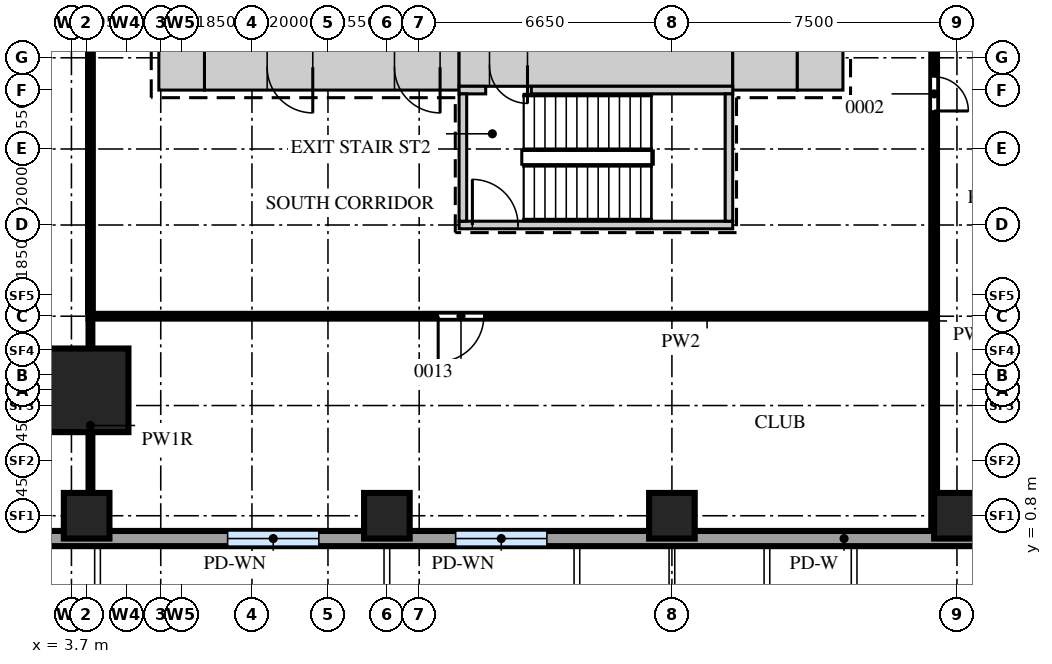
"""IFC4 building model, lengths in metres.
Left out: names, types, materials, properties, quantities, classifications, styles, units other than length and angle.
Written with IfcOpenShell. Run it as: python <this file> out.ifc"""

import sys

from ifc_helpers import new_model, si_unit, direction, frame, frame_2d, origin, origin_2d, place, context, subcontext, project, spatial, rectangle, extrude, source, transform, mapped, element, fill, save


model = new_model("IFC4")
c1 = context("Model", 3, precision=1e-05, world=origin(), true_north=direction((0.0, 1.0)))
c2 = subcontext(c1, "Body", "Model", "MODEL_VIEW")
j1 = project(units=[si_unit("LENGTHUNIT", "METRE"), si_unit("PLANEANGLEUNIT", "RADIAN")], contexts=[c1])
p1 = place(None, origin())
s1 = spatial("IfcSite", under=j1, at=p1, CompositionType="ELEMENT")
p2 = place(p1, origin())
s2 = spatial("IfcBuilding", under=s1, at=p2, CompositionType="ELEMENT")
p3 = place(p2, frame((0.0, 0.0, 28.5)))
s3 = spatial("IfcBuildingStorey", under=s2, at=p3, CompositionType="ELEMENT", Elevation=28.5)
m1 = source(origin(), c2, "Body", "SweptSolid", [
    extrude(rectangle(XDim=6.7, YDim=1.2, at=frame_2d((3.35, 0.0))), origin(), (0.0, 0.0, 1.0), 4.0),
])
p4 = place(p3, frame((7.2, 12.6, 0.0), z_axis=(0.0, 0.0, 1.0), x_axis=(1.0, 0.0, 0.0)))
e1 = element("IfcWall", 1, at=p4, inside=s3, PredefinedType="SHEAR", context=c2, shape_type="MappedRepresentation", body=[
    mapped(m1, transform((0.0, 0.0, 0.0))),
])
m2 = source(origin(), c2, "Body", "SweptSolid", [
    extrude(rectangle(XDim=1.2, YDim=2.1, at=frame_2d((0.6, 1.05))), frame((0.0, 0.61, 0.0), z_axis=(0.0, -1.0, 0.0), x_axis=(1.0, 0.0, 0.0)), (0.0, 0.0, 1.0), 1.22),
])
p5 = place(p4, frame((5.0, 0.0, 0.0)))
e2 = element("IfcOpeningElement", 2, at=p5, cuts=e1, PredefinedType="OPENING", context=c2, shape_type="MappedRepresentation", body=[
    mapped(m2, transform((0.0, 0.0, 0.0))),
])
p6 = place(p4, frame((1.65, 0.0, 0.0)))
e3 = element("IfcOpeningElement", 3, at=p6, cuts=e1, PredefinedType="OPENING", context=c2, shape_type="MappedRepresentation", body=[
    mapped(m2, transform((0.0, 0.0, 0.0))),
])
m3 = source(origin(), c2, "Body", "SweptSolid", [
    extrude(rectangle(XDim=7.2, YDim=1.1, at=frame_2d((3.6, 0.0))), origin(), (0.0, 0.0, 1.0), 4.0),
])
p7 = place(p3, frame((13.9, 12.65, 0.0), z_axis=(0.0, 0.0, 1.0), x_axis=(1.0, 0.0, 0.0)))
e4 = element("IfcWall", 4, at=p7, inside=s3, PredefinedType="SHEAR", context=c2, shape_type="MappedRepresentation", body=[
    mapped(m3, transform((0.0, 0.0, 0.0))),
])
m4 = source(origin(), c2, "Body", "SweptSolid", [
    extrude(rectangle(XDim=1.0, YDim=2.1, at=frame_2d((0.5, 1.05))), frame((0.0, 0.56, 0.0), z_axis=(0.0, -1.0, 0.0), x_axis=(1.0, 0.0, 0.0)), (0.0, 0.0, 1.0), 1.12),
])
p8 = place(p7, frame((0.8, 0.0, 0.0)))
e5 = element("IfcOpeningElement", 5, at=p8, cuts=e4, PredefinedType="OPENING", context=c2, shape_type="MappedRepresentation", body=[
    mapped(m4, transform((0.0, 0.0, 0.0))),
])
m5 = source(origin(), c2, "Body", "SweptSolid", [
    extrude(rectangle(XDim=1.7, YDim=1.2, at=frame_2d((0.85, 0.0))), origin(), (0.0, 0.0, 1.0), 4.0),
])
p9 = place(p3, frame((21.1, 12.6, 0.0), z_axis=(0.0, 0.0, 1.0), x_axis=(1.0, 0.0, 0.0)))
e6 = element("IfcWall", 6, at=p9, inside=s3, PredefinedType="SHEAR", context=c2, shape_type="MappedRepresentation", body=[
    mapped(m5, transform((0.0, 0.0, 0.0))),
])
m6 = source(origin(), c2, "Body", "SweptSolid", [
    extrude(rectangle(XDim=1.2, YDim=1.2, at=frame_2d((0.6, 0.0))), origin(), (0.0, 0.0, 1.0), 4.0),
])
for number, where, z_axis, x_axis in (
    (7, (22.8, 12.6, 0.0), (0.0, 0.0, 1.0), (1.0, 0.0, 0.0)),
    (8, (6.0, 12.6, 0.0), (0.0, 0.0, 1.0), (1.0, 0.0, 0.0)),
):
    element("IfcWall", number, at=place(p3, frame(where, z_axis=z_axis, x_axis=x_axis)), inside=s3, PredefinedType="SHEAR", context=c2, shape_type="MappedRepresentation", body=[
        mapped(m6, transform((0.0, 0.0, 0.0))),
    ])
m7 = source(origin(), c2, "Body", "SweptSolid", [
    extrude(rectangle(XDim=0.7, YDim=0.2, at=frame_2d((0.35, 0.0))), origin(), (0.0, 0.0, 1.0), 4.0),
])
p10 = place(p3, frame((13.9, 12.0, 0.0), z_axis=(0.0, 0.0, 1.0), x_axis=(1.0, 0.0, 0.0)))
e9 = element("IfcWall", 9, at=p10, inside=s3, PredefinedType="SHEAR", context=c2, shape_type="MappedRepresentation", body=[
    mapped(m7, transform((0.0, 0.0, 0.0))),
])
m8 = source(origin(), c2, "Body", "SweptSolid", [
    extrude(rectangle(XDim=5.3, YDim=0.2, at=frame_2d((2.65, 0.0))), origin(), (0.0, 0.0, 1.0), 4.0),
])
p11 = place(p3, frame((15.8, 12.0, 0.0), z_axis=(0.0, 0.0, 1.0), x_axis=(1.0, 0.0, 0.0)))
e10 = element("IfcWall", 10, at=p11, inside=s3, PredefinedType="SHEAR", context=c2, shape_type="MappedRepresentation", body=[
    mapped(m8, transform((0.0, 0.0, 0.0))),
])
m9 = source(origin(), c2, "Body", "SweptSolid", [
    extrude(rectangle(XDim=7.2, YDim=0.2, at=frame_2d((3.6, 0.0))), origin(), (0.0, 0.0, 1.0), 4.0),
])
p12 = place(p3, frame((13.9, 8.45, 0.0), z_axis=(0.0, 0.0, 1.0), x_axis=(1.0, 0.0, 0.0)))
e11 = element("IfcWall", 11, at=p12, inside=s3, PredefinedType="SHEAR", context=c2, shape_type="MappedRepresentation", body=[
    mapped(m9, transform((0.0, 0.0, 0.0))),
])
m10 = source(origin(), c2, "Body", "SweptSolid", [
    extrude(rectangle(XDim=1.2, YDim=2.1, at=frame_2d((0.6, 1.05))), frame((0.0, 0.11, 0.0), z_axis=(0.0, -1.0, 0.0), x_axis=(1.0, 0.0, 0.0)), (0.0, 0.0, 1.0), 0.22),
])
p13 = place(p12, frame((0.35, 0.0, 0.0)))
e12 = element("IfcOpeningElement", 12, at=p13, cuts=e11, PredefinedType="OPENING", context=c2, shape_type="MappedRepresentation", body=[
    mapped(m10, transform((0.0, 0.0, 0.0))),
])
m11 = source(origin(), c2, "Body", "SweptSolid", [
    extrude(rectangle(XDim=3.35, YDim=0.2, at=frame_2d((1.675, 0.0))), origin(), (0.0, 0.0, 1.0), 4.0),
])
for number, where, z_axis, x_axis in (
    (13, (21.0, 8.55, 0.0), (0.0, 0.0, 1.0), (0.0, 1.0, 0.0)),
    (14, (14.0, 8.55, 0.0), (0.0, 0.0, 1.0), (0.0, 1.0, 0.0)),
):
    element("IfcWall", number, at=place(p3, frame(where, z_axis=z_axis, x_axis=x_axis)), inside=s3, PredefinedType="SHEAR", context=c2, shape_type="MappedRepresentation", body=[
        mapped(m11, transform((0.0, 0.0, 0.0))),
    ])
m12 = source(origin(), c2, "Body", "SweptSolid", [
    extrude(rectangle(XDim=2.2, YDim=2.2, at=origin_2d()), origin(), (0.0, 0.0, 1.0), 4.5),
])
p14 = place(p3, frame((4.1, 4.1, 0.0), z_axis=(0.0, 0.0, 1.0), x_axis=(1.0, 0.0, 0.0)))
e15 = element("IfcColumn", 15, at=p14, inside=s3, PredefinedType="COLUMN", context=c2, shape_type="MappedRepresentation", body=[
    mapped(m12, transform((0.0, 0.0, 0.0))),
])
m13 = source(origin(), c2, "Body", "SweptSolid", [
    extrude(rectangle(XDim=1.2, YDim=1.2, at=origin_2d()), origin(), (0.0, 0.0, 1.0), 4.0),
])
for number, where, z_axis, x_axis in (
    (16, (4.1, 0.8, 0.0), (0.0, 0.0, 1.0), (1.0, 0.0, 0.0)),
    (17, (12.0, 0.8, 0.0), (0.0, 0.0, 1.0), (1.0, 0.0, 0.0)),
    (18, (19.5, 0.8, 0.0), (0.0, 0.0, 1.0), (1.0, 0.0, 0.0)),
    (19, (27.0, 0.8, 0.0), (0.0, 0.0, 1.0), (1.0, 0.0, 0.0)),
):
    element("IfcColumn", number, at=place(p3, frame(where, z_axis=z_axis, x_axis=x_axis)), inside=s3, PredefinedType="COLUMN", context=c2, shape_type="MappedRepresentation", body=[
        mapped(m13, transform((0.0, 0.0, 0.0))),
    ])
m14 = source(origin(), c2, "Body", "SweptSolid", [
    extrude(rectangle(XDim=33.64, YDim=0.4, at=frame_2d((16.82, 0.0))), origin(), (0.0, 0.0, 1.0), 4.2),
])
p15 = place(p3, frame((-1.79, 0.2, 0.0), z_axis=(0.0, 0.0, 1.0), x_axis=(1.0, 0.0, 0.0)))
e20 = element("IfcWall", 20, at=p15, inside=s3, PredefinedType="SOLIDWALL", context=c2, shape_type="MappedRepresentation", body=[
    mapped(m14, transform((0.0, 0.0, 0.0))),
])
m15 = source(origin(), c2, "Body", "SweptSolid", [
    extrude(rectangle(XDim=2.4, YDim=2.4, at=frame_2d((1.2, 1.2))), frame((0.0, 0.21, 0.0), z_axis=(0.0, -1.0, 0.0), x_axis=(1.0, 0.0, 0.0)), (0.0, 0.0, 1.0), 0.42),
])
p16 = place(p15, frame((9.6, 0.0, 1.0)))
e21 = element("IfcOpeningElement", 21, at=p16, cuts=e20, PredefinedType="OPENING", context=c2, shape_type="MappedRepresentation", body=[
    mapped(m15, transform((0.0, 0.0, 0.0))),
])
p17 = place(p15, frame((15.6, 0.0, 1.0)))
e22 = element("IfcOpeningElement", 22, at=p17, cuts=e20, PredefinedType="OPENING", context=c2, shape_type="MappedRepresentation", body=[
    mapped(m15, transform((0.0, 0.0, 0.0))),
])
m16 = source(origin(), c2, "Body", "SweptSolid", [
    extrude(rectangle(XDim=5.55, YDim=0.1, at=frame_2d((2.775, 0.0))), origin(), (0.0, 0.0, 1.0), 3.4),
])
p18 = place(p3, frame((4.2, 0.4, 0.0), z_axis=(0.0, 0.0, 1.0), x_axis=(0.0, 1.0, 0.0)))
e23 = element("IfcWall", 23, at=p18, inside=s3, PredefinedType="PARTITIONING", context=c2, shape_type="MappedRepresentation", body=[
    mapped(m16, transform((0.0, 0.0, 0.0))),
])
m17 = source(origin(), c2, "Body", "SweptSolid", [
    extrude(rectangle(XDim=17.5, YDim=0.15, at=frame_2d((8.75, 0.0))), origin(), (0.0, 0.0, 1.0), 4.0),
])
p19 = place(p3, frame((26.4, 0.4, 0.0), z_axis=(0.0, 0.0, 1.0), x_axis=(0.0, 1.0, 0.0)))
e24 = element("IfcWall", 24, at=p19, inside=s3, PredefinedType="PARTITIONING", context=c2, shape_type="MappedRepresentation", body=[
    mapped(m17, transform((0.0, 0.0, 0.0))),
])
m18 = source(origin(), c2, "Body", "SweptSolid", [
    extrude(rectangle(XDim=0.9, YDim=2.1, at=frame_2d((0.45, 1.05))), frame((0.0, 0.085, 0.0), z_axis=(0.0, -1.0, 0.0), x_axis=(1.0, 0.0, 0.0)), (0.0, 0.0, 1.0), 0.17),
])
p20 = place(p19, frame((11.05, 0.0, 0.0)))
e25 = element("IfcOpeningElement", 25, at=p20, cuts=e24, PredefinedType="OPENING", context=c2, shape_type="MappedRepresentation", body=[
    mapped(m18, transform((0.0, 0.0, 0.0))),
])
m19 = source(origin(), c2, "Body", "SweptSolid", [
    extrude(rectangle(XDim=22.15, YDim=0.125, at=frame_2d((11.075, 0.0))), origin(), (0.0, 0.0, 1.0), 4.0),
])
p21 = place(p3, frame((4.15, 6.05, 0.0), z_axis=(0.0, 0.0, 1.0), x_axis=(1.0, 0.0, 0.0)))
e26 = element("IfcWall", 26, at=p21, inside=s3, PredefinedType="PARTITIONING", context=c2, shape_type="MappedRepresentation", body=[
    mapped(m19, transform((0.0, 0.0, 0.0))),
])
m20 = source(origin(), c2, "Body", "SweptSolid", [
    extrude(rectangle(XDim=1.2, YDim=2.1, at=frame_2d((0.6, 1.05))), frame((0.0, 0.073, 0.0), z_axis=(0.0, -1.0, 0.0), x_axis=(1.0, 0.0, 0.0)), (0.0, 0.0, 1.0), 0.145),
])
p22 = place(p21, frame((9.2, 0.0, 0.0)))
e27 = element("IfcOpeningElement", 27, at=p22, cuts=e26, PredefinedType="OPENING", context=c2, shape_type="MappedRepresentation", body=[
    mapped(m20, transform((0.0, 0.0, 0.0))),
])
m21 = source(origin(), c2, "Body", "SweptSolid", [
    extrude(rectangle(XDim=41.8, YDim=0.125, at=frame_2d((20.9, 0.0))), origin(), (0.0, 0.0, 1.0), 4.0),
])
p23 = place(p3, frame((4.2, 6.15, 0.0), z_axis=(0.0, 0.0, 1.0), x_axis=(0.0, 1.0, 0.0)))
e28 = element("IfcWall", 28, at=p23, inside=s3, PredefinedType="PARTITIONING", context=c2, shape_type="MappedRepresentation", body=[
    mapped(m21, transform((0.0, 0.0, 0.0))),
])
p24 = place(p23, frame((9.45, 0.0, 0.0)))
e29 = element("IfcOpeningElement", 29, at=p24, cuts=e28, PredefinedType="OPENING", context=c2, shape_type="MappedRepresentation", body=[
    mapped(m20, transform((0.0, 0.0, 0.0))),
])
p25 = place(p23, frame((28.05, 0.0, 0.0)))
e30 = element("IfcOpeningElement", 30, at=p25, cuts=e28, PredefinedType="OPENING", context=c2, shape_type="MappedRepresentation", body=[
    mapped(m20, transform((0.0, 0.0, 0.0))),
])
m22 = source(origin(), c2, "Body", "SweptSolid", [
    extrude(rectangle(XDim=2.4, YDim=2.4, at=frame_2d((1.2, 1.2))), frame((0.0, 0.03, 0.0), z_axis=(0.0, -1.0, 0.0), x_axis=(1.0, 0.0, 0.0)), (0.0, 0.0, 1.0), 0.06),
])
p26 = place(p16, origin())
e31 = element("IfcWindow", 31, at=p26, inside=s3, PartitioningType="SINGLE_PANEL", PredefinedType="WINDOW", context=c2, shape_type="MappedRepresentation", body=[
    mapped(m22, transform((0.0, 0.0, 0.0))),
])
fill(e21, e31)
p27 = place(p17, origin())
e32 = element("IfcWindow", 32, at=p27, inside=s3, PartitioningType="SINGLE_PANEL", PredefinedType="WINDOW", context=c2, shape_type="MappedRepresentation", body=[
    mapped(m22, transform((0.0, 0.0, 0.0))),
])
fill(e22, e32)
m23 = source(origin(), c2, "Body", "SweptSolid", [
    extrude(rectangle(XDim=1.2, YDim=2.1, at=frame_2d((0.6, 1.05))), frame((0.0, 0.55, 0.0), z_axis=(0.0, -1.0, 0.0), x_axis=(1.0, 0.0, 0.0)), (0.0, 0.0, 1.0), 1.1),
])
p28 = place(p5, origin())
e33 = element("IfcDoor", 33, at=p28, inside=s3, OperationType="SINGLE_SWING_RIGHT", PredefinedType="DOOR", context=c2, shape_type="MappedRepresentation", body=[
    mapped(m23, transform((0.0, 0.0, 0.0))),
])
fill(e2, e33)
p29 = place(p6, origin())
e34 = element("IfcDoor", 34, at=p29, inside=s3, OperationType="SINGLE_SWING_RIGHT", PredefinedType="DOOR", context=c2, shape_type="MappedRepresentation", body=[
    mapped(m23, transform((0.0, 0.0, 0.0))),
])
fill(e3, e34)
m24 = source(origin(), c2, "Body", "SweptSolid", [
    extrude(rectangle(XDim=1.0, YDim=2.1, at=frame_2d((0.5, 1.05))), frame((0.0, 0.5, 0.0), z_axis=(0.0, -1.0, 0.0), x_axis=(1.0, 0.0, 0.0)), (0.0, 0.0, 1.0), 1.0),
])
p30 = place(p8, origin())
e35 = element("IfcDoor", 35, at=p30, inside=s3, OperationType="SINGLE_SWING_RIGHT", PredefinedType="DOOR", context=c2, shape_type="MappedRepresentation", body=[
    mapped(m24, transform((0.0, 0.0, 0.0))),
])
fill(e5, e35)
m25 = source(origin(), c2, "Body", "SweptSolid", [
    extrude(rectangle(XDim=0.9, YDim=2.1, at=frame_2d((0.45, 1.05))), frame((0.0, 0.025, 0.0), z_axis=(0.0, -1.0, 0.0), x_axis=(1.0, 0.0, 0.0)), (0.0, 0.0, 1.0), 0.05),
])
p31 = place(p20, origin())
e36 = element("IfcDoor", 36, at=p31, inside=s3, OperationType="SINGLE_SWING_LEFT", PredefinedType="DOOR", context=c2, shape_type="MappedRepresentation", body=[
    mapped(m25, transform((0.0, 0.0, 0.0))),
])
fill(e25, e36)
m26 = source(origin(), c2, "Body", "SweptSolid", [
    extrude(rectangle(XDim=1.2, YDim=2.1, at=frame_2d((0.6, 1.05))), frame((0.0, 0.025, 0.0), z_axis=(0.0, -1.0, 0.0), x_axis=(1.0, 0.0, 0.0)), (0.0, 0.0, 1.0), 0.05),
])
p32 = place(p22, origin())
e37 = element("IfcDoor", 37, at=p32, inside=s3, OperationType="SINGLE_SWING_LEFT", PredefinedType="DOOR", context=c2, shape_type="MappedRepresentation", body=[
    mapped(m26, transform((0.0, 0.0, 0.0))),
])
fill(e27, e37)
p33 = place(p13, origin())
e38 = element("IfcDoor", 38, at=p33, inside=s3, OperationType="SINGLE_SWING_RIGHT", PredefinedType="DOOR", context=c2, shape_type="MappedRepresentation", body=[
    mapped(m26, transform((0.0, 0.0, 0.0))),
])
fill(e12, e38)
save(model, sys.argv[1])
